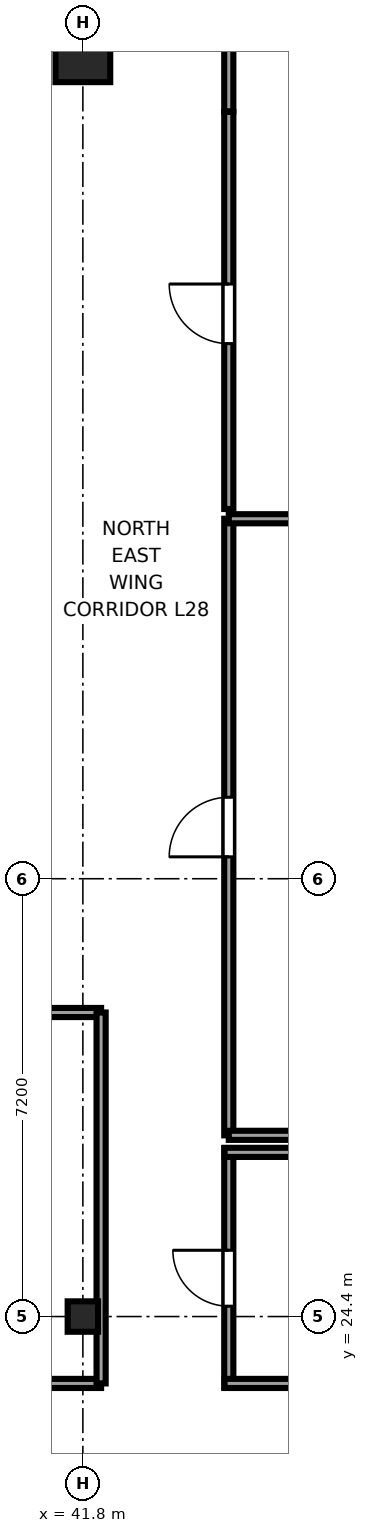
"""IFC4 building model, lengths in metres.
Left out: names, types, materials, properties, quantities, classifications, styles, units other than length and angle.
Written with IfcOpenShell. Run it as: python <this file> out.ifc"""

import sys

from ifc_helpers import new_model, si_unit, direction, frame, frame_2d, origin, origin_2d, place, context, subcontext, project, spatial, rectangle, i_section, extrude, source, transform, mapped, element, fill, save


model = new_model("IFC4")
c1 = context("Model", 3, precision=1e-05, world=origin(), true_north=direction((0.0, 1.0)))
c2 = subcontext(c1, "Body", "Model", "MODEL_VIEW")
j1 = project(units=[si_unit("LENGTHUNIT", "METRE"), si_unit("PLANEANGLEUNIT", "RADIAN")], contexts=[c1])
p1 = place(None, origin())
s1 = spatial("IfcSite", under=j1, at=p1, CompositionType="ELEMENT")
p2 = place(p1, origin())
s2 = spatial("IfcBuilding", under=s1, at=p2, CompositionType="ELEMENT")
p3 = place(p2, frame((0.0, 0.0, 111.55)))
s3 = spatial("IfcBuildingStorey", under=s2, at=p3, CompositionType="ELEMENT", Elevation=111.55)
m1 = source(origin(), c2, "Body", "SweptSolid", [
    extrude(i_section(OverallWidth=0.5, OverallDepth=0.5, WebThickness=0.022, FlangeThickness=0.034, at=origin_2d()), origin(), (0.0, 0.0, 1.0), 3.55),
])
p4 = place(p3, frame((41.8, 24.4, 0.0), z_axis=(0.0, 0.0, 1.0), x_axis=(1.0, 0.0, 0.0)))
e1 = element("IfcColumn", 1, at=p4, inside=s3, PredefinedType="COLUMN", context=c2, shape_type="MappedRepresentation", body=[
    mapped(m1, transform((0.0, 0.0, 0.0), x_axis=(1.0, 0.0, 0.0), y_axis=(0.0, 1.0, 0.0), z_axis=(0.0, 0.0, 1.0), scale=1.0)),
])
m2 = source(origin(), c2, "Body", "SweptSolid", [
    extrude(rectangle(XDim=0.9, YDim=0.9, at=origin_2d()), origin(), (0.0, 0.0, 1.0), 3.55),
])
p5 = place(p3, frame((41.8, 45.15, 0.0), z_axis=(0.0, 0.0, 1.0), x_axis=(1.0, 0.0, 0.0)))
e2 = element("IfcColumn", 2, at=p5, inside=s3, PredefinedType="COLUMN", context=c2, shape_type="MappedRepresentation", body=[
    mapped(m2, transform((0.0, 0.0, 0.0), x_axis=(1.0, 0.0, 0.0), y_axis=(0.0, 1.0, 0.0), z_axis=(0.0, 0.0, 1.0), scale=1.0)),
])
p6 = place(p3, frame((44.2, 23.23, 0.0), z_axis=(0.0, 0.0, 1.0), x_axis=(0.0, 1.0, 0.0)))
e3 = element("IfcWall", 3, at=p6, inside=s3, PredefinedType="PARTITIONING", context=c2, shape_type="SweptSolid", body=[
    extrude(rectangle(XDim=3.94, YDim=0.15, at=frame_2d((1.97, 0.0))), origin(), (0.0, 0.0, 1.0), 3.37),
])
p7 = place(p6, frame((1.34, 0.0, 0.0)))
e4 = element("IfcOpeningElement", 4, at=p7, cuts=e3, PredefinedType="OPENING", context=c2, shape_type="SweptSolid", body=[
    extrude(rectangle(XDim=0.92, YDim=2.01, at=frame_2d((0.46, 1.005))), frame((0.0, 0.085, 0.0), z_axis=(0.0, -1.0, 0.0), x_axis=(1.0, 0.0, 0.0)), (0.0, 0.0, 1.0), 0.17),
])
for number, where, z_axis, x_axis in (
    (5, (44.13, 23.3, 0.0), (0.0, 0.0, 1.0), (1.0, 0.0, 0.0)),
    (6, (44.13, 27.1, 0.0), (0.0, 0.0, 1.0), (1.0, 0.0, 0.0)),
):
    element("IfcWall", number, at=place(p3, frame(where, z_axis=z_axis, x_axis=x_axis)), inside=s3, PredefinedType="PARTITIONING", context=c2, shape_type="SweptSolid", body=[
        extrude(rectangle(XDim=4.54, YDim=0.15, at=frame_2d((2.27, 0.0))), origin(), (0.0, 0.0, 1.0), 3.37),
    ])
p8 = place(p3, frame((44.2, 27.38, 0.0), z_axis=(0.0, 0.0, 1.0), x_axis=(0.0, 1.0, 0.0)))
e7 = element("IfcWall", 7, at=p8, inside=s3, PredefinedType="PARTITIONING", context=c2, shape_type="SweptSolid", body=[
    extrude(rectangle(XDim=10.14, YDim=0.15, at=frame_2d((5.07, 0.0))), origin(), (0.0, 0.0, 1.0), 3.37),
])
p9 = place(p8, frame((4.58, 0.0, 0.0)))
e8 = element("IfcOpeningElement", 8, at=p9, cuts=e7, PredefinedType="OPENING", context=c2, shape_type="SweptSolid", body=[
    extrude(rectangle(XDim=0.98, YDim=2.12, at=frame_2d((0.49, 1.06))), frame((0.0, 0.085, 0.0), z_axis=(0.0, -1.0, 0.0), x_axis=(1.0, 0.0, 0.0)), (0.0, 0.0, 1.0), 0.17),
])
p10 = place(p3, frame((44.2, 27.38, 0.0), z_axis=(0.0, 0.0, 1.0), x_axis=(1.0, 0.0, 0.0)))
e9 = element("IfcWall", 9, at=p10, inside=s3, PredefinedType="PARTITIONING", context=c2, shape_type="SweptSolid", body=[
    extrude(rectangle(XDim=12.395, YDim=0.15, at=frame_2d((6.198, 0.0))), origin(), (0.0, 0.0, 1.0), 3.37),
])
p11 = place(p3, frame((44.2, 37.52, 0.0), z_axis=(0.0, 0.0, 1.0), x_axis=(1.0, 0.0, 0.0)))
e10 = element("IfcWall", 10, at=p11, inside=s3, PredefinedType="PARTITIONING", context=c2, shape_type="SweptSolid", body=[
    extrude(rectangle(XDim=10.03, YDim=0.15, at=frame_2d((5.015, 0.0))), origin(), (0.0, 0.0, 1.0), 3.37),
])
p12 = place(p3, frame((44.2, 37.68, 0.0), z_axis=(0.0, 0.0, 1.0), x_axis=(0.0, 1.0, 0.0)))
e11 = element("IfcWall", 11, at=p12, inside=s3, PredefinedType="PARTITIONING", context=c2, shape_type="SweptSolid", body=[
    extrude(rectangle(XDim=6.53, YDim=0.15, at=frame_2d((3.265, 0.0))), origin(), (0.0, 0.0, 1.0), 3.37),
])
p13 = place(p12, frame((2.72, 0.0, 0.0)))
e12 = element("IfcOpeningElement", 12, at=p13, cuts=e11, PredefinedType="OPENING", context=c2, shape_type="SweptSolid", body=[
    extrude(rectangle(XDim=0.98, YDim=2.12, at=frame_2d((0.49, 1.06))), frame((0.0, 0.085, 0.0), z_axis=(0.0, -1.0, 0.0), x_axis=(1.0, 0.0, 0.0)), (0.0, 0.0, 1.0), 0.17),
])
p14 = place(p3, frame((44.2, 44.22, 0.0), z_axis=(0.0, 0.0, 1.0), x_axis=(0.0, 1.0, 0.0)))
e13 = element("IfcWall", 13, at=p14, inside=s3, PredefinedType="PARTITIONING", context=c2, shape_type="SweptSolid", body=[
    extrude(rectangle(XDim=1.375, YDim=0.15, at=frame_2d((0.688, 0.0))), origin(), (0.0, 0.0, 1.0), 3.37),
])
p15 = place(p3, frame((34.6, 23.3, 0.0), z_axis=(0.0, 0.0, 1.0), x_axis=(1.0, 0.0, 0.0)))
e14 = element("IfcWall", 14, at=p15, inside=s3, PredefinedType="PARTITIONING", context=c2, shape_type="SweptSolid", body=[
    extrude(rectangle(XDim=7.5, YDim=0.15, at=frame_2d((3.75, 0.0))), origin(), (0.0, 0.0, 1.0), 3.37),
])
p16 = place(p15, frame((2.925, 0.0, 0.0)))
e15 = element("IfcOpeningElement", 15, at=p16, cuts=e14, PredefinedType="OPENING", context=c2, shape_type="SweptSolid", body=[
    extrude(rectangle(XDim=1.65, YDim=2.15, at=frame_2d((0.825, 1.075))), frame((0.0, 0.085, 0.0), z_axis=(0.0, -1.0, 0.0), x_axis=(1.0, 0.0, 0.0)), (0.0, 0.0, 1.0), 0.17),
])
p17 = place(p3, frame((34.6, 29.4, 0.0), z_axis=(0.0, 0.0, 1.0), x_axis=(1.0, 0.0, 0.0)))
e16 = element("IfcWall", 16, at=p17, inside=s3, PredefinedType="PARTITIONING", context=c2, shape_type="SweptSolid", body=[
    extrude(rectangle(XDim=7.5, YDim=0.15, at=frame_2d((3.75, 0.0))), origin(), (0.0, 0.0, 1.0), 3.37),
])
p18 = place(p3, frame((42.1, 23.3, 0.0), z_axis=(0.0, 0.0, 1.0), x_axis=(0.0, 1.0, 0.0)))
e17 = element("IfcWall", 17, at=p18, inside=s3, PredefinedType="PARTITIONING", context=c2, shape_type="SweptSolid", body=[
    extrude(rectangle(XDim=6.1, YDim=0.15, at=frame_2d((3.05, 0.0))), origin(), (0.0, 0.0, 1.0), 2.16),
])
m3 = source(origin(), c2, "Body", "SweptSolid", [
    extrude(rectangle(XDim=0.92, YDim=2.01, at=frame_2d((0.46, 1.005))), frame((0.0, 0.025, 0.0), z_axis=(0.0, -1.0, 0.0), x_axis=(1.0, 0.0, 0.0)), (0.0, 0.0, 1.0), 0.05),
])
p19 = place(p7, origin())
e18 = element("IfcDoor", 18, at=p19, inside=s3, OperationType="SINGLE_SWING_RIGHT", PredefinedType="DOOR", context=c2, shape_type="MappedRepresentation", body=[
    mapped(m3, transform((0.0, 0.0, 0.0), x_axis=(1.0, 0.0, 0.0), y_axis=(0.0, 1.0, 0.0), z_axis=(0.0, 0.0, 1.0), scale=1.0)),
])
fill(e4, e18)
m4 = source(origin(), c2, "Body", "SweptSolid", [
    extrude(rectangle(XDim=0.98, YDim=2.12, at=frame_2d((0.49, 1.06))), frame((0.0, 0.025, 0.0), z_axis=(0.0, -1.0, 0.0), x_axis=(1.0, 0.0, 0.0)), (0.0, 0.0, 1.0), 0.05),
])
p20 = place(p9, origin())
e19 = element("IfcDoor", 19, at=p20, inside=s3, OperationType="SINGLE_SWING_LEFT", PredefinedType="DOOR", context=c2, shape_type="MappedRepresentation", body=[
    mapped(m4, transform((0.0, 0.0, 0.0), x_axis=(1.0, 0.0, 0.0), y_axis=(0.0, 1.0, 0.0), z_axis=(0.0, 0.0, 1.0), scale=1.0)),
])
fill(e8, e19)
p21 = place(p13, origin())
e20 = element("IfcDoor", 20, at=p21, inside=s3, OperationType="SINGLE_SWING_RIGHT", PredefinedType="DOOR", context=c2, shape_type="MappedRepresentation", body=[
    mapped(m4, transform((0.0, 0.0, 0.0), x_axis=(1.0, 0.0, 0.0), y_axis=(0.0, 1.0, 0.0), z_axis=(0.0, 0.0, 1.0), scale=1.0)),
])
fill(e12, e20)
save(model, sys.argv[1])
